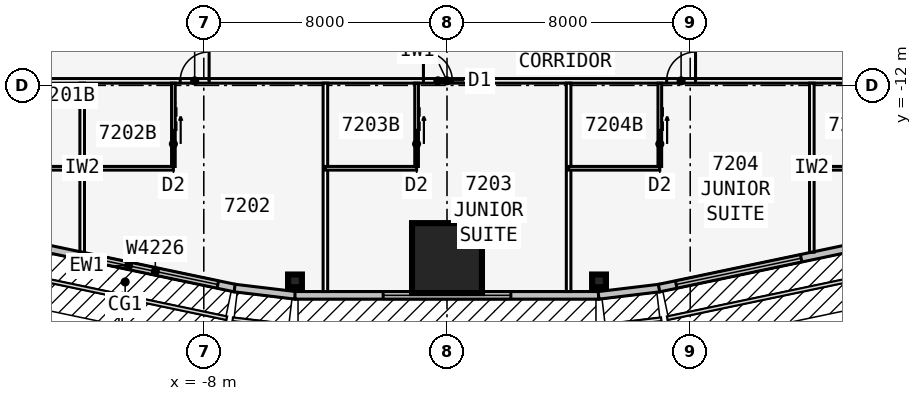
"""IFC4 building model, lengths in metres.
Left out: names, types, materials, properties, quantities, classifications, styles, units other than length and angle.
Written with IfcOpenShell. Run it as: python <this file> out.ifc"""

import sys

from ifc_helpers import new_model, si_unit, direction, frame, frame_2d, origin, origin_2d, place, context, subcontext, project, spatial, rectangle, i_section, extrude, element, fill, save


model = new_model("IFC4")
c1 = context("Model", 3, precision=1e-05, world=origin(), true_north=direction((0.0, 1.0)))
c2 = subcontext(c1, "Body", "Model", "MODEL_VIEW")
j1 = project(units=[si_unit("LENGTHUNIT", "METRE"), si_unit("PLANEANGLEUNIT", "RADIAN")], contexts=[c1])
p1 = place(None, origin())
s1 = spatial("IfcSite", under=j1, at=p1, CompositionType="ELEMENT")
p2 = place(p1, origin())
s2 = spatial("IfcBuilding", under=s1, at=p2, CompositionType="ELEMENT")
p3 = place(p2, frame((0.0, 0.0, 271.7)))
s3 = spatial("IfcBuildingStorey", under=s2, at=p3, CompositionType="ELEMENT", Elevation=271.7)
for number, where, z_axis, x_axis in (
    (1, (-5.0, -18.43, 0.0), (0.0, 0.0, 1.0), (0.0, -1.0, 0.0)),
    (2, (5.0, -18.43, 0.0), (0.0, 0.0, 1.0), (0.0, -1.0, 0.0)),
):
    element("IfcColumn", number, at=place(p3, frame(where, z_axis=z_axis, x_axis=x_axis)), inside=s3, PredefinedType="COLUMN", context=c2, shape_type="SweptSolid", body=[
        extrude(i_section(OverallWidth=0.419, OverallDepth=0.455, WebThickness=0.042, FlangeThickness=0.068, at=origin_2d()), origin(), (0.0, 0.0, 1.0), 3.6),
    ])
p4 = place(p3, frame((0.0, -17.68, 0.0), z_axis=(0.0, 0.0, 1.0), x_axis=(0.0, -1.0, 0.0)))
e3 = element("IfcColumn", 3, at=p4, inside=s3, PredefinedType="COLUMN", context=c2, shape_type="SweptSolid", body=[
    extrude(rectangle(XDim=2.3, YDim=2.3, at=origin_2d()), origin(), (0.0, 0.0, 1.0), 3.6),
])
p5 = place(p3, frame((-13.974, -17.198, 0.0), z_axis=(0.0, 0.0, 1.0), x_axis=(0.978654320409, -0.205513311355, 0.0)))
e4 = element("IfcWall", 4, at=p5, inside=s3, PredefinedType="STANDARD", context=c2, shape_type="SweptSolid", body=[
    extrude(rectangle(XDim=7.153, YDim=0.25, at=frame_2d((3.576, 0.0))), origin(), (0.0, 0.0, 1.0), 3.35),
])
p6 = place(p5, frame((2.376, 0.0, 0.45)))
e5 = element("IfcOpeningElement", 5, at=p6, cuts=e4, PredefinedType="OPENING", context=c2, shape_type="SweptSolid", body=[
    extrude(rectangle(XDim=4.2, YDim=2.6, at=frame_2d((2.1, 1.3))), frame((0.0, 0.135, 0.0), z_axis=(0.0, -1.0, 0.0), x_axis=(1.0, 0.0, 0.0)), (0.0, 0.0, 1.0), 0.27),
])
p7 = place(p3, frame((-6.985, -18.667, 0.0), z_axis=(0.0, 0.0, 1.0), x_axis=(0.992877411981, -0.119140441403, 0.0)))
e6 = element("IfcWall", 6, at=p7, inside=s3, PredefinedType="STANDARD", context=c2, shape_type="SweptSolid", body=[
    extrude(rectangle(XDim=2.014, YDim=0.25, at=frame_2d((1.007, 0.0))), origin(), (0.0, 0.0, 1.0), 3.35),
])
p8 = place(p3, frame((-5.0, -18.906, 0.0), z_axis=(0.0, 0.0, 1.0), x_axis=(1.0, 0.0, 0.0)))
e7 = element("IfcWall", 7, at=p8, inside=s3, PredefinedType="STANDARD", context=c2, shape_type="SweptSolid", body=[
    extrude(rectangle(XDim=10.0, YDim=0.25, at=frame_2d((5.0, 0.0))), origin(), (0.0, 0.0, 1.0), 3.35),
])
p9 = place(p8, frame((2.9, 0.0, 0.45)))
e8 = element("IfcOpeningElement", 8, at=p9, cuts=e7, PredefinedType="OPENING", context=c2, shape_type="SweptSolid", body=[
    extrude(rectangle(XDim=4.2, YDim=2.6, at=frame_2d((2.1, 1.3))), frame((0.0, 0.135, 0.0), z_axis=(0.0, -1.0, 0.0), x_axis=(1.0, 0.0, 0.0)), (0.0, 0.0, 1.0), 0.27),
])
p10 = place(p3, frame((4.985, -18.906, 0.0), z_axis=(0.0, 0.0, 1.0), x_axis=(0.992877411981, 0.119140441403, 0.0)))
e9 = element("IfcWall", 9, at=p10, inside=s3, PredefinedType="STANDARD", context=c2, shape_type="SweptSolid", body=[
    extrude(rectangle(XDim=2.014, YDim=0.25, at=frame_2d((1.007, 0.0))), origin(), (0.0, 0.0, 1.0), 3.35),
])
p11 = place(p3, frame((6.974, -18.668, 0.0), z_axis=(0.0, 0.0, 1.0), x_axis=(0.978654320409, 0.205513311355, 0.0)))
e10 = element("IfcWall", 10, at=p11, inside=s3, PredefinedType="STANDARD", context=c2, shape_type="SweptSolid", body=[
    extrude(rectangle(XDim=7.153, YDim=0.25, at=frame_2d((3.576, 0.0))), origin(), (0.0, 0.0, 1.0), 3.35),
])
p12 = place(p11, frame((0.577, 0.0, 0.45)))
e11 = element("IfcOpeningElement", 11, at=p12, cuts=e10, PredefinedType="OPENING", context=c2, shape_type="SweptSolid", body=[
    extrude(rectangle(XDim=4.2, YDim=2.6, at=frame_2d((2.1, 1.3))), frame((0.0, 0.135, 0.0), z_axis=(0.0, -1.0, 0.0), x_axis=(1.0, 0.0, 0.0)), (0.0, 0.0, 1.0), 0.27),
])
p13 = place(p3, frame((-19.827, -11.851, 0.0), z_axis=(0.0, 0.0, 1.0), x_axis=(1.0, 0.0, 0.0)))
e12 = element("IfcWall", 12, at=p13, inside=s3, PredefinedType="PARTITIONING", context=c2, shape_type="SweptSolid", body=[
    extrude(rectangle(XDim=39.654, YDim=0.15, at=frame_2d((19.827, 0.0))), origin(), (0.0, 0.0, 1.0), 3.35),
])
p14 = place(p13, frame((3.652, 0.0, 0.0)))
e13 = element("IfcOpeningElement", 13, at=p14, cuts=e12, PredefinedType="OPENING", context=c2, shape_type="SweptSolid", body=[
    extrude(rectangle(XDim=0.95, YDim=2.13, at=frame_2d((0.475, 1.065))), frame((0.0, 0.085, 0.0), z_axis=(0.0, -1.0, 0.0), x_axis=(1.0, 0.0, 0.0)), (0.0, 0.0, 1.0), 0.17),
])
p15 = place(p13, frame((11.052, 0.0, 0.0)))
e14 = element("IfcOpeningElement", 14, at=p15, cuts=e12, PredefinedType="OPENING", context=c2, shape_type="SweptSolid", body=[
    extrude(rectangle(XDim=0.95, YDim=2.13, at=frame_2d((0.475, 1.065))), frame((0.0, 0.085, 0.0), z_axis=(0.0, -1.0, 0.0), x_axis=(1.0, 0.0, 0.0)), (0.0, 0.0, 1.0), 0.17),
])
p16 = place(p13, frame((19.052, 0.0, 0.0)))
e15 = element("IfcOpeningElement", 15, at=p16, cuts=e12, PredefinedType="OPENING", context=c2, shape_type="SweptSolid", body=[
    extrude(rectangle(XDim=0.95, YDim=2.13, at=frame_2d((0.475, 1.065))), frame((0.0, 0.085, 0.0), z_axis=(0.0, -1.0, 0.0), x_axis=(1.0, 0.0, 0.0)), (0.0, 0.0, 1.0), 0.17),
])
p17 = place(p13, frame((27.052, 0.0, 0.0)))
e16 = element("IfcOpeningElement", 16, at=p17, cuts=e12, PredefinedType="OPENING", context=c2, shape_type="SweptSolid", body=[
    extrude(rectangle(XDim=0.95, YDim=2.13, at=frame_2d((0.475, 1.065))), frame((0.0, 0.085, 0.0), z_axis=(0.0, -1.0, 0.0), x_axis=(1.0, 0.0, 0.0)), (0.0, 0.0, 1.0), 0.17),
])
p18 = place(p13, frame((35.052, 0.0, 0.0)))
e17 = element("IfcOpeningElement", 17, at=p18, cuts=e12, PredefinedType="OPENING", context=c2, shape_type="SweptSolid", body=[
    extrude(rectangle(XDim=0.95, YDim=2.13, at=frame_2d((0.475, 1.065))), frame((0.0, 0.085, 0.0), z_axis=(0.0, -1.0, 0.0), x_axis=(1.0, 0.0, 0.0)), (0.0, 0.0, 1.0), 0.17),
])
p19 = place(p3, frame((-12.0, -11.926, 0.0), z_axis=(0.0, 0.0, 1.0), x_axis=(0.0, -1.0, 0.0)))
e18 = element("IfcWall", 18, at=p19, inside=s3, PredefinedType="PARTITIONING", context=c2, shape_type="SweptSolid", body=[
    extrude(rectangle(XDim=5.559, YDim=0.15, at=frame_2d((2.779, 0.0))), origin(), (0.0, 0.0, 1.0), 2.301),
])
for number, where, z_axis, x_axis in (
    (19, (-4.0, -11.926, 0.0), (0.0, 0.0, 1.0), (0.0, -1.0, 0.0)),
    (20, (4.0, -11.926, 0.0), (0.0, 0.0, 1.0), (0.0, -1.0, 0.0)),
):
    element("IfcWall", number, at=place(p3, frame(where, z_axis=z_axis, x_axis=x_axis)), inside=s3, PredefinedType="PARTITIONING", context=c2, shape_type="SweptSolid", body=[
        extrude(rectangle(XDim=6.854, YDim=0.15, at=frame_2d((3.427, 0.0))), origin(), (0.0, 0.0, 1.0), 3.35),
    ])
p20 = place(p3, frame((12.0, -11.926, 0.0), z_axis=(0.0, 0.0, 1.0), x_axis=(0.0, -1.0, 0.0)))
e21 = element("IfcWall", 21, at=p20, inside=s3, PredefinedType="PARTITIONING", context=c2, shape_type="SweptSolid", body=[
    extrude(rectangle(XDim=5.559, YDim=0.15, at=frame_2d((2.779, 0.0))), origin(), (0.0, 0.0, 1.0), 2.301),
])
for number, where, z_axis, x_axis in (
    (22, (-15.0, -14.726, 0.0), (0.0, 0.0, 1.0), (1.0, 0.0, 0.0)),
    (23, (-12.0, -14.726, 0.0), (0.0, 0.0, 1.0), (1.0, 0.0, 0.0)),
):
    element("IfcWall", number, at=place(p3, frame(where, z_axis=z_axis, x_axis=x_axis)), inside=s3, PredefinedType="PLUMBINGWALL", context=c2, shape_type="SweptSolid", body=[
        extrude(rectangle(XDim=3.0, YDim=0.12, at=frame_2d((1.5, 0.0))), origin(), (0.0, 0.0, 1.0), 3.35),
    ])
p21 = place(p3, frame((-9.0, -11.926, 0.0), z_axis=(0.0, 0.0, 1.0), x_axis=(0.0, -1.0, 0.0)))
e24 = element("IfcWall", 24, at=p21, inside=s3, PredefinedType="PLUMBINGWALL", context=c2, shape_type="SweptSolid", body=[
    extrude(rectangle(XDim=2.74, YDim=0.12, at=frame_2d((1.37, 0.0))), origin(), (0.0, 0.0, 1.0), 3.35),
])
p22 = place(p21, frame((1.55, 0.0, 0.0)))
e25 = element("IfcOpeningElement", 25, at=p22, cuts=e24, PredefinedType="OPENING", context=c2, shape_type="SweptSolid", body=[
    extrude(rectangle(XDim=0.9, YDim=2.13, at=frame_2d((0.45, 1.065))), frame((0.0, 0.07, 0.0), z_axis=(0.0, -1.0, 0.0), x_axis=(1.0, 0.0, 0.0)), (0.0, 0.0, 1.0), 0.14),
])
p23 = place(p3, frame((-4.0, -14.726, 0.0), z_axis=(0.0, 0.0, 1.0), x_axis=(1.0, 0.0, 0.0)))
e26 = element("IfcWall", 26, at=p23, inside=s3, PredefinedType="PLUMBINGWALL", context=c2, shape_type="SweptSolid", body=[
    extrude(rectangle(XDim=3.0, YDim=0.12, at=frame_2d((1.5, 0.0))), origin(), (0.0, 0.0, 1.0), 3.35),
])
p24 = place(p3, frame((-1.0, -11.926, 0.0), z_axis=(0.0, 0.0, 1.0), x_axis=(0.0, -1.0, 0.0)))
e27 = element("IfcWall", 27, at=p24, inside=s3, PredefinedType="PLUMBINGWALL", context=c2, shape_type="SweptSolid", body=[
    extrude(rectangle(XDim=2.74, YDim=0.12, at=frame_2d((1.37, 0.0))), origin(), (0.0, 0.0, 1.0), 3.35),
])
p25 = place(p24, frame((1.55, 0.0, 0.0)))
e28 = element("IfcOpeningElement", 28, at=p25, cuts=e27, PredefinedType="OPENING", context=c2, shape_type="SweptSolid", body=[
    extrude(rectangle(XDim=0.9, YDim=2.13, at=frame_2d((0.45, 1.065))), frame((0.0, 0.07, 0.0), z_axis=(0.0, -1.0, 0.0), x_axis=(1.0, 0.0, 0.0)), (0.0, 0.0, 1.0), 0.14),
])
p26 = place(p3, frame((4.0, -14.726, 0.0), z_axis=(0.0, 0.0, 1.0), x_axis=(1.0, 0.0, 0.0)))
e29 = element("IfcWall", 29, at=p26, inside=s3, PredefinedType="PLUMBINGWALL", context=c2, shape_type="SweptSolid", body=[
    extrude(rectangle(XDim=3.0, YDim=0.12, at=frame_2d((1.5, 0.0))), origin(), (0.0, 0.0, 1.0), 3.35),
])
p27 = place(p3, frame((7.0, -11.926, 0.0), z_axis=(0.0, 0.0, 1.0), x_axis=(0.0, -1.0, 0.0)))
e30 = element("IfcWall", 30, at=p27, inside=s3, PredefinedType="PLUMBINGWALL", context=c2, shape_type="SweptSolid", body=[
    extrude(rectangle(XDim=2.74, YDim=0.12, at=frame_2d((1.37, 0.0))), origin(), (0.0, 0.0, 1.0), 2.309),
])
p28 = place(p27, frame((1.55, 0.0, 0.0)))
e31 = element("IfcOpeningElement", 31, at=p28, cuts=e30, PredefinedType="OPENING", context=c2, shape_type="SweptSolid", body=[
    extrude(rectangle(XDim=0.9, YDim=2.13, at=frame_2d((0.45, 1.065))), frame((0.0, 0.07, 0.0), z_axis=(0.0, -1.0, 0.0), x_axis=(1.0, 0.0, 0.0)), (0.0, 0.0, 1.0), 0.14),
])
p29 = place(p3, frame((12.0, -14.726, 0.0), z_axis=(0.0, 0.0, 1.0), x_axis=(1.0, 0.0, 0.0)))
e32 = element("IfcWall", 32, at=p29, inside=s3, PredefinedType="PLUMBINGWALL", context=c2, shape_type="SweptSolid", body=[
    extrude(rectangle(XDim=3.0, YDim=0.12, at=frame_2d((1.5, 0.0))), origin(), (0.0, 0.0, 1.0), 3.35),
])
p30 = place(p3, frame((20.177, -11.245, 0.0), z_axis=(0.0, 0.0, 1.0), x_axis=(-0.499998875317, 0.866026053119, 0.0)))
e33 = element("IfcWall", 33, at=p30, inside=s3, PredefinedType="PARTITIONING", context=c2, shape_type="SweptSolid", body=[
    extrude(rectangle(XDim=39.654, YDim=0.15, at=frame_2d((19.827, 0.0))), origin(), (0.0, 0.0, 1.0), 3.35),
])
p31 = place(p30, frame((11.352, 0.0, 0.0)))
e34 = element("IfcOpeningElement", 34, at=p31, cuts=e33, PredefinedType="OPENING", context=c2, shape_type="SweptSolid", body=[
    extrude(rectangle(XDim=0.95, YDim=2.13, at=frame_2d((0.475, 1.065))), frame((0.0, 0.085, 0.0), z_axis=(0.0, -1.0, 0.0), x_axis=(1.0, 0.0, 0.0)), (0.0, 0.0, 1.0), 0.17),
])
p32 = place(p3, frame((-0.35, 23.096, 0.0), z_axis=(0.0, 0.0, 1.0), x_axis=(-0.499998875317, -0.866026053119, 0.0)))
e35 = element("IfcWall", 35, at=p32, inside=s3, PredefinedType="PARTITIONING", context=c2, shape_type="SweptSolid", body=[
    extrude(rectangle(XDim=39.654, YDim=0.15, at=frame_2d((19.827, 0.0))), origin(), (0.0, 0.0, 1.0), 3.35),
])
p33 = place(p32, frame((3.272, 0.0, 0.0)))
e36 = element("IfcOpeningElement", 36, at=p33, cuts=e35, PredefinedType="OPENING", context=c2, shape_type="SweptSolid", body=[
    extrude(rectangle(XDim=0.95, YDim=2.13, at=frame_2d((0.475, 1.065))), frame((0.0, 0.085, 0.0), z_axis=(0.0, -1.0, 0.0), x_axis=(1.0, 0.0, 0.0)), (0.0, 0.0, 1.0), 0.17),
])
p34 = place(p32, frame((19.052, 0.0, 0.0)))
e37 = element("IfcOpeningElement", 37, at=p34, cuts=e35, PredefinedType="OPENING", context=c2, shape_type="SweptSolid", body=[
    extrude(rectangle(XDim=0.95, YDim=2.13, at=frame_2d((0.475, 1.065))), frame((0.0, 0.085, 0.0), z_axis=(0.0, -1.0, 0.0), x_axis=(1.0, 0.0, 0.0)), (0.0, 0.0, 1.0), 0.17),
])
p35 = place(p32, frame((35.432, 0.0, 0.0)))
e38 = element("IfcOpeningElement", 38, at=p35, cuts=e35, PredefinedType="OPENING", context=c2, shape_type="SweptSolid", body=[
    extrude(rectangle(XDim=0.95, YDim=2.13, at=frame_2d((0.475, 1.065))), frame((0.0, 0.085, 0.0), z_axis=(0.0, -1.0, 0.0), x_axis=(1.0, 0.0, 0.0)), (0.0, 0.0, 1.0), 0.17),
])
p36 = place(p6, origin())
e39 = element("IfcWindow", 39, at=p36, inside=s3, PartitioningType="SINGLE_PANEL", PredefinedType="WINDOW", context=c2, shape_type="SweptSolid", body=[
    extrude(rectangle(XDim=4.2, YDim=2.6, at=frame_2d((2.1, 1.3))), frame((0.0, 0.03, 0.0), z_axis=(0.0, -1.0, 0.0), x_axis=(1.0, 0.0, 0.0)), (0.0, 0.0, 1.0), 0.06),
])
fill(e5, e39)
p37 = place(p9, origin())
e40 = element("IfcWindow", 40, at=p37, inside=s3, PartitioningType="SINGLE_PANEL", PredefinedType="WINDOW", context=c2, shape_type="SweptSolid", body=[
    extrude(rectangle(XDim=4.2, YDim=2.6, at=frame_2d((2.1, 1.3))), frame((0.0, 0.03, 0.0), z_axis=(0.0, -1.0, 0.0), x_axis=(1.0, 0.0, 0.0)), (0.0, 0.0, 1.0), 0.06),
])
fill(e8, e40)
p38 = place(p12, origin())
e41 = element("IfcWindow", 41, at=p38, inside=s3, PartitioningType="SINGLE_PANEL", PredefinedType="WINDOW", context=c2, shape_type="SweptSolid", body=[
    extrude(rectangle(XDim=4.2, YDim=2.6, at=frame_2d((2.1, 1.3))), frame((0.0, 0.03, 0.0), z_axis=(0.0, -1.0, 0.0), x_axis=(1.0, 0.0, 0.0)), (0.0, 0.0, 1.0), 0.06),
])
fill(e11, e41)
p39 = place(p22, origin())
e42 = element("IfcDoor", 42, at=p39, inside=s3, OperationType="SLIDING_TO_LEFT", PredefinedType="DOOR", context=c2, shape_type="SweptSolid", body=[
    extrude(rectangle(XDim=0.9, YDim=2.13, at=frame_2d((0.45, 1.065))), frame((0.0, 0.025, 0.0), z_axis=(0.0, -1.0, 0.0), x_axis=(1.0, 0.0, 0.0)), (0.0, 0.0, 1.0), 0.05),
])
fill(e25, e42)
p40 = place(p15, origin())
e43 = element("IfcDoor", 43, at=p40, inside=s3, OperationType="SINGLE_SWING_RIGHT", PredefinedType="DOOR", context=c2, shape_type="SweptSolid", body=[
    extrude(rectangle(XDim=0.95, YDim=2.13, at=frame_2d((0.475, 1.065))), frame((0.0, 0.025, 0.0), z_axis=(0.0, -1.0, 0.0), x_axis=(1.0, 0.0, 0.0)), (0.0, 0.0, 1.0), 0.05),
])
fill(e14, e43)
p41 = place(p25, origin())
e44 = element("IfcDoor", 44, at=p41, inside=s3, OperationType="SLIDING_TO_LEFT", PredefinedType="DOOR", context=c2, shape_type="SweptSolid", body=[
    extrude(rectangle(XDim=0.9, YDim=2.13, at=frame_2d((0.45, 1.065))), frame((0.0, 0.025, 0.0), z_axis=(0.0, -1.0, 0.0), x_axis=(1.0, 0.0, 0.0)), (0.0, 0.0, 1.0), 0.05),
])
fill(e28, e44)
p42 = place(p16, origin())
e45 = element("IfcDoor", 45, at=p42, inside=s3, OperationType="SINGLE_SWING_LEFT", PredefinedType="DOOR", context=c2, shape_type="SweptSolid", body=[
    extrude(rectangle(XDim=0.95, YDim=2.13, at=frame_2d((0.475, 1.065))), frame((0.0, 0.025, 0.0), z_axis=(0.0, -1.0, 0.0), x_axis=(1.0, 0.0, 0.0)), (0.0, 0.0, 1.0), 0.05),
])
fill(e15, e45)
p43 = place(p28, origin())
e46 = element("IfcDoor", 46, at=p43, inside=s3, OperationType="SLIDING_TO_LEFT", PredefinedType="DOOR", context=c2, shape_type="SweptSolid", body=[
    extrude(rectangle(XDim=0.9, YDim=2.13, at=frame_2d((0.45, 1.065))), frame((0.0, 0.025, 0.0), z_axis=(0.0, -1.0, 0.0), x_axis=(1.0, 0.0, 0.0)), (0.0, 0.0, 1.0), 0.05),
])
fill(e31, e46)
p44 = place(p17, origin())
e47 = element("IfcDoor", 47, at=p44, inside=s3, OperationType="SINGLE_SWING_RIGHT", PredefinedType="DOOR", context=c2, shape_type="SweptSolid", body=[
    extrude(rectangle(XDim=0.95, YDim=2.13, at=frame_2d((0.475, 1.065))), frame((0.0, 0.025, 0.0), z_axis=(0.0, -1.0, 0.0), x_axis=(1.0, 0.0, 0.0)), (0.0, 0.0, 1.0), 0.05),
])
fill(e16, e47)
save(model, sys.argv[1])
